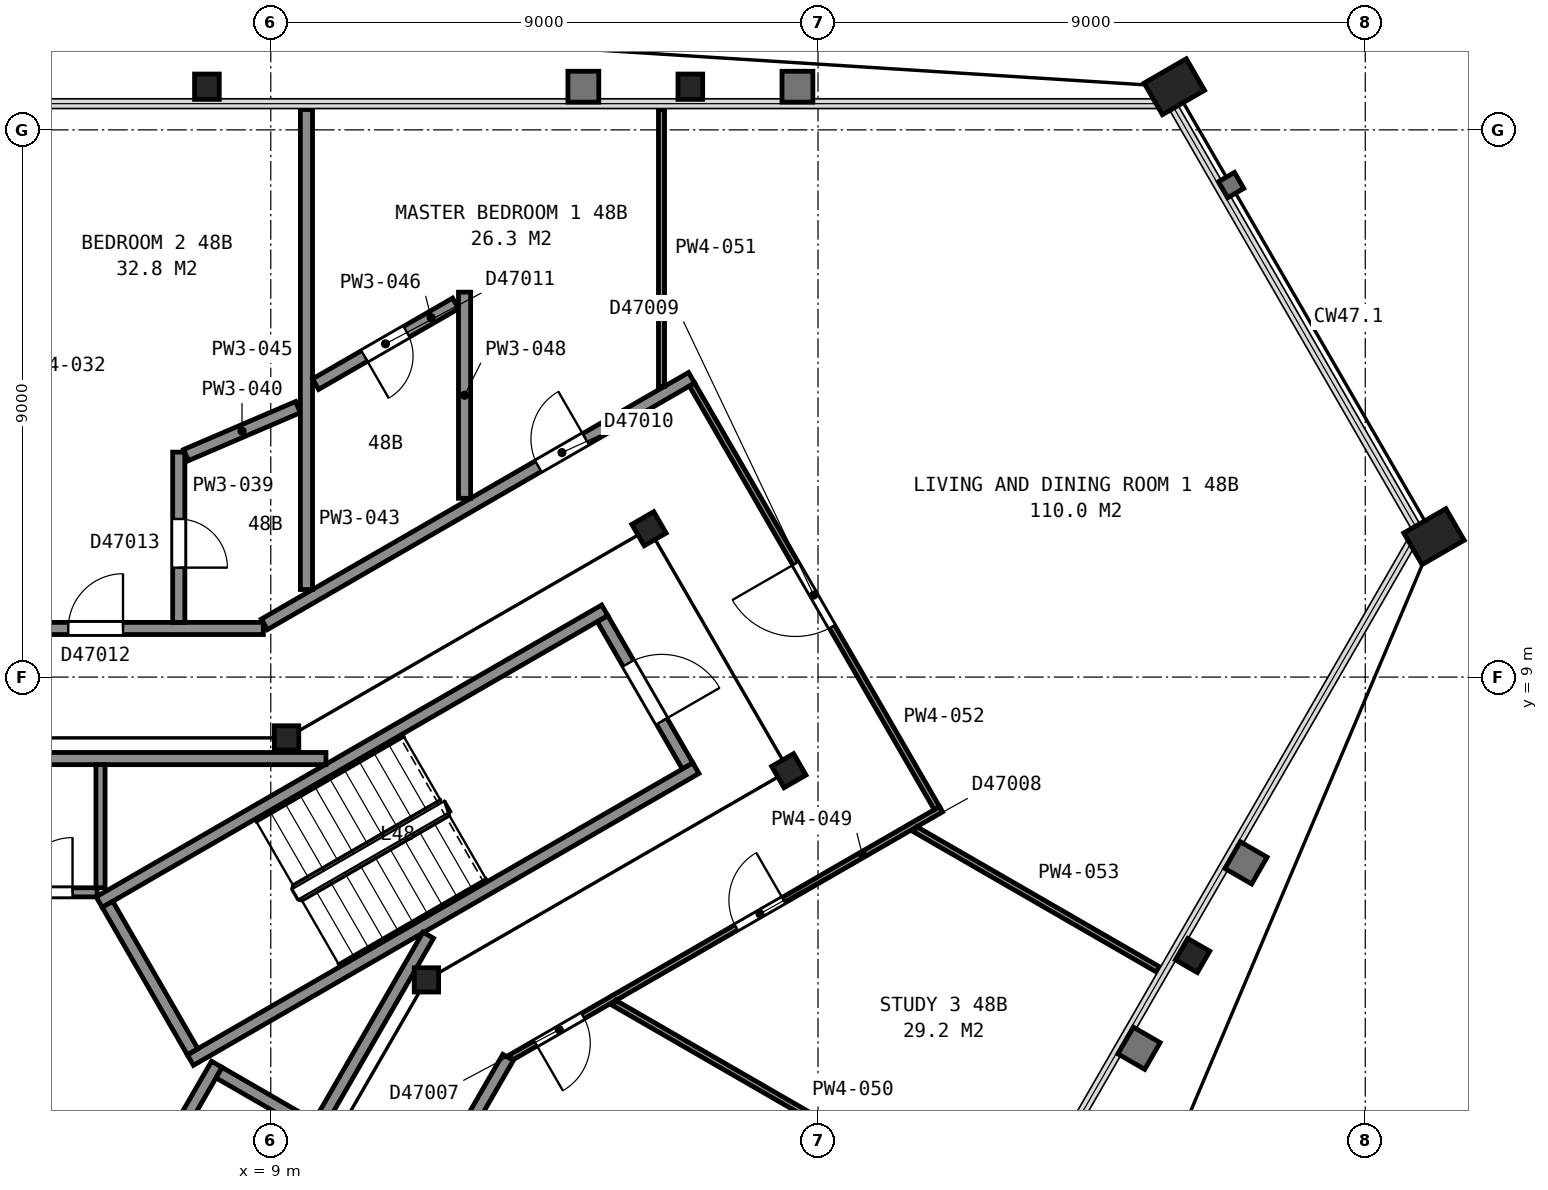
"""IFC4 building model, lengths in metres.
Left out: names, types, materials, properties, quantities, classifications, styles, units other than length and angle.
Written with IfcOpenShell. Run it as: python <this file> out.ifc"""

import sys

from ifc_helpers import new_model, si_unit, direction, frame, frame_2d, origin, origin_2d, place, context, subcontext, project, spatial, rectangle, hollow_rectangle, i_section, extrude, element, fill, save


model = new_model("IFC4")
c1 = context("Model", 3, precision=1e-05, world=origin(), true_north=direction((0.0, 1.0)))
c2 = subcontext(c1, "Body", "Model", "MODEL_VIEW")
j1 = project(units=[si_unit("LENGTHUNIT", "METRE"), si_unit("PLANEANGLEUNIT", "RADIAN")], contexts=[c1])
p1 = place(None, origin())
s1 = spatial("IfcSite", under=j1, at=p1, CompositionType="ELEMENT")
p2 = place(p1, origin())
s2 = spatial("IfcBuilding", under=s1, at=p2, CompositionType="ELEMENT")
p3 = place(p2, frame((0.0, 0.0, 193.2)))
s3 = spatial("IfcBuildingStorey", under=s2, at=p3, CompositionType="ELEMENT", Elevation=193.2)
p4 = place(p3, frame((23.86, 18.71, 0.0), z_axis=(0.0, 0.0, 1.0), x_axis=(0.5, -0.866025403784, 0.0)))
e1 = element("IfcColumn", 1, at=p4, inside=s3, PredefinedType="COLUMN", context=c2, shape_type="SweptSolid", body=[
    extrude(hollow_rectangle(XDim=0.6, YDim=0.8, WallThickness=0.05, at=origin_2d()), origin(), (0.0, 0.0, 1.0), 3.7),
])
for number, where, z_axis, x_axis in (
    (2, (15.9, 18.71, 0.0), (0.0, 0.0, 1.0), (1.0, 0.0, 0.0)),
    (3, (7.95, 18.71, 0.0), (0.0, 0.0, 1.0), (1.0, 0.0, 0.0)),
    (4, (24.16, 4.42, 0.0), (0.0, 0.0, 1.0), (-0.5, -0.866, 0.0)),
):
    element("IfcColumn", number, at=place(p3, frame(where, z_axis=z_axis, x_axis=x_axis)), inside=s3, PredefinedType="COLUMN", context=c2, shape_type="SweptSolid", body=[
        extrude(i_section(OverallWidth=0.406, OverallDepth=0.417, WebThickness=0.03, FlangeThickness=0.048, FilletRadius=0.015, at=origin_2d()), origin(), (0.0, 0.0, 1.0), 3.7),
    ])
p5 = place(p3, frame((28.13, 11.31, 0.0), z_axis=(0.0, 0.0, 1.0), x_axis=(0.5, -0.866025403784, 0.0)))
e5 = element("IfcColumn", 5, at=p5, inside=s3, PredefinedType="COLUMN", context=c2, shape_type="SweptSolid", body=[
    extrude(hollow_rectangle(XDim=0.6, YDim=0.8, WallThickness=0.05, at=origin_2d()), origin(), (0.0, 0.0, 1.0), 3.7),
])
p6 = place(p3, frame((11.56, 4.02, 0.0), z_axis=(0.0, 0.0, 1.0), x_axis=(1.0, 0.0, 0.0)))
e6 = element("IfcColumn", 6, at=p6, inside=s3, PredefinedType="COLUMN", context=c2, shape_type="SweptSolid", body=[
    extrude(i_section(OverallWidth=0.401, OverallDepth=0.399, WebThickness=0.025, FlangeThickness=0.04, FilletRadius=0.015, at=origin_2d()), origin(), (0.0, 0.0, 1.0), 3.7),
])
for number, where, z_axis, x_axis in (
    (7, (17.52, 7.46, 0.0), (0.0, 0.0, 1.0), (0.5, -0.866, 0.0)),
    (8, (15.22, 11.44, 0.0), (0.0, 0.0, 1.0), (0.5, -0.866, 0.0)),
):
    element("IfcColumn", number, at=place(p3, frame(where, z_axis=z_axis, x_axis=x_axis)), inside=s3, PredefinedType="COLUMN", context=c2, shape_type="SweptSolid", body=[
        extrude(i_section(OverallWidth=0.406, OverallDepth=0.417, WebThickness=0.03, FlangeThickness=0.048, FilletRadius=0.015, at=origin_2d()), origin(), (0.0, 0.0, 1.0), 3.7),
    ])
p7 = place(p3, frame((9.26, 8.0, 0.0), z_axis=(0.0, 0.0, 1.0), x_axis=(1.0, 0.0, 0.0)))
e9 = element("IfcColumn", 9, at=p7, inside=s3, PredefinedType="COLUMN", context=c2, shape_type="SweptSolid", body=[
    extrude(i_section(OverallWidth=0.401, OverallDepth=0.399, WebThickness=0.025, FlangeThickness=0.04, FilletRadius=0.015, at=origin_2d()), origin(), (0.0, 0.0, 1.0), 3.7),
])
p8 = place(p3, frame((15.855, 7.538, 0.0), z_axis=(0.0, 0.0, 1.0), x_axis=(-0.500049511043, 0.865996816683, 0.0)))
e10 = element("IfcWall", 10, at=p8, inside=s3, PredefinedType="PARTITIONING", context=c2, shape_type="SweptSolid", body=[
    extrude(rectangle(XDim=2.8, YDim=0.2, at=frame_2d((1.4, 0.0))), origin(), (0.0, 0.0, 1.0), 3.45),
])
p9 = place(p8, frame((0.85, 0.0, 0.0)))
e11 = element("IfcOpeningElement", 11, at=p9, cuts=e10, PredefinedType="OPENING", context=c2, shape_type="SweptSolid", body=[
    extrude(rectangle(XDim=1.1, YDim=2.1, at=frame_2d((0.55, 1.05))), frame((0.0, 0.11, 0.0), z_axis=(0.0, -1.0, 0.0), x_axis=(1.0, 0.0, 0.0)), (0.0, 0.0, 1.0), 0.22),
])
for number, where, z_axis, x_axis in (
    (12, (6.178, 5.299, 0.0), (0.0, 0.0, 1.0), (0.866, 0.5, 0.0)),
    (13, (7.678, 2.701, 0.0), (0.0, 0.0, 1.0), (0.866, 0.5, 0.0)),
):
    element("IfcWall", number, at=place(p3, frame(where, z_axis=z_axis, x_axis=x_axis)), inside=s3, PredefinedType="PARTITIONING", context=c2, shape_type="SweptSolid", body=[
        extrude(rectangle(XDim=9.6, YDim=0.2, at=frame_2d((4.8, 0.0))), origin(), (0.0, 0.0, 1.0), 3.45),
    ])
p10 = place(p3, frame((7.715, 2.838, 0.0), z_axis=(0.0, 0.0, 1.0), x_axis=(-0.500049511043, 0.865996816683, 0.0)))
e14 = element("IfcWall", 14, at=p10, inside=s3, PredefinedType="PARTITIONING", context=c2, shape_type="SweptSolid", body=[
    extrude(rectangle(XDim=2.8, YDim=0.2, at=frame_2d((1.4, 0.0))), origin(), (0.0, 0.0, 1.0), 3.45),
])
p11 = place(p3, frame((5.663, -1.612, 0.0), z_axis=(0.0, 0.0, 1.0), x_axis=(0.49998122708, 0.866036242063, 0.0)))
e15 = element("IfcWall", 15, at=p11, inside=s3, PredefinedType="PARTITIONING", context=c2, shape_type="SweptSolid", body=[
    extrude(rectangle(XDim=4.9, YDim=0.2, at=frame_2d((2.45, 0.0))), origin(), (0.0, 0.0, 1.0), 3.7),
])
p12 = place(p3, frame((9.665, 1.62, 0.0), z_axis=(0.0, 0.0, 1.0), x_axis=(-0.866002029911, 0.500040482552, 0.0)))
e16 = element("IfcWall", 16, at=p12, inside=s3, PredefinedType="PARTITIONING", context=c2, shape_type="SweptSolid", body=[
    extrude(rectangle(XDim=1.75, YDim=0.2, at=frame_2d((0.875, 0.0))), origin(), (0.0, 0.0, 1.0), 3.7),
])
p13 = place(p3, frame((-3.933, 7.66, 0.0), z_axis=(0.0, 0.0, 1.0), x_axis=(1.0, 0.0, 0.0)))
e17 = element("IfcWall", 17, at=p13, inside=s3, PredefinedType="PARTITIONING", context=c2, shape_type="SweptSolid", body=[
    extrude(rectangle(XDim=13.841, YDim=0.2, at=frame_2d((6.92, 0.0))), origin(), (0.0, 0.0, 1.0), 3.45),
])
p14 = place(p3, frame((0.925, 5.46, 0.0), z_axis=(0.0, 0.0, 1.0), x_axis=(1.0, 0.0, 0.0)))
e18 = element("IfcWall", 18, at=p14, inside=s3, PredefinedType="PARTITIONING", context=c2, shape_type="SweptSolid", body=[
    extrude(rectangle(XDim=5.22, YDim=0.15, at=frame_2d((2.61, 0.0))), origin(), (0.0, 0.0, 1.0), 3.45),
])
p15 = place(p14, frame((3.915, 0.0, 0.0)))
e19 = element("IfcOpeningElement", 19, at=p15, cuts=e18, PredefinedType="OPENING", context=c2, shape_type="SweptSolid", body=[
    extrude(rectangle(XDim=0.9, YDim=2.1, at=frame_2d((0.45, 1.05))), frame((0.0, 0.085, 0.0), z_axis=(0.0, -1.0, 0.0), x_axis=(1.0, 0.0, 0.0)), (0.0, 0.0, 1.0), 0.17),
])
p16 = place(p3, frame((6.2, 5.535, 0.0), z_axis=(0.0, 0.0, 1.0), x_axis=(0.0, 1.0, 0.0)))
e20 = element("IfcWall", 20, at=p16, inside=s3, PredefinedType="PARTITIONING", context=c2, shape_type="SweptSolid", body=[
    extrude(rectangle(XDim=2.025, YDim=0.15, at=frame_2d((1.013, 0.0))), origin(), (0.0, 0.0, 1.0), 3.45),
])
p17 = place(p3, frame((9.803, 1.658, 0.0), z_axis=(0.0, 0.0, 1.0), x_axis=(0.499943114462, 0.866058244174, 0.0)))
e21 = element("IfcWall", 21, at=p17, inside=s3, PredefinedType="PARTITIONING", context=c2, shape_type="SweptSolid", body=[
    extrude(rectangle(XDim=3.576, YDim=0.2, at=frame_2d((1.788, 0.0))), origin(), (0.0, 0.0, 1.0), 3.45),
])
p18 = place(p3, frame((-8.828, 9.8, 0.0), z_axis=(0.0, 0.0, 1.0), x_axis=(1.0, 0.0, 0.0)))
e22 = element("IfcWall", 22, at=p18, inside=s3, PredefinedType="PARTITIONING", context=c2, shape_type="SweptSolid", body=[
    extrude(rectangle(XDim=17.706, YDim=0.2, at=frame_2d((8.853, 0.0))), origin(), (0.0, 0.0, 1.0), 2.713),
])
p19 = place(p18, frame((14.498, 0.0, 0.0)))
e23 = element("IfcOpeningElement", 23, at=p19, cuts=e22, PredefinedType="OPENING", context=c2, shape_type="SweptSolid", body=[
    extrude(rectangle(XDim=0.9, YDim=2.1, at=frame_2d((0.45, 1.05))), frame((0.0, 0.11, 0.0), z_axis=(0.0, -1.0, 0.0), x_axis=(1.0, 0.0, 0.0)), (0.0, 0.0, 1.0), 0.22),
])
p20 = place(p18, frame((10.919, 0.0, 0.0)))
e24 = element("IfcOpeningElement", 24, at=p20, cuts=e22, PredefinedType="OPENING", context=c2, shape_type="SweptSolid", body=[
    extrude(rectangle(XDim=0.9, YDim=2.1, at=frame_2d((0.45, 1.05))), frame((0.0, 0.11, 0.0), z_axis=(0.0, -1.0, 0.0), x_axis=(1.0, 0.0, 0.0)), (0.0, 0.0, 1.0), 0.22),
])
p21 = place(p18, frame((6.113, 0.0, 0.0)))
e25 = element("IfcOpeningElement", 25, at=p21, cuts=e22, PredefinedType="OPENING", context=c2, shape_type="SweptSolid", body=[
    extrude(rectangle(XDim=0.9, YDim=2.1, at=frame_2d((0.45, 1.05))), frame((0.0, 0.11, 0.0), z_axis=(0.0, -1.0, 0.0), x_axis=(1.0, 0.0, 0.0)), (0.0, 0.0, 1.0), 0.22),
])
p22 = place(p3, frame((12.903, 2.745, 0.0), z_axis=(0.0, 0.0, 1.0), x_axis=(-0.499992063946, -0.866029985619, 0.0)))
e26 = element("IfcWall", 26, at=p22, inside=s3, PredefinedType="PARTITIONING", context=c2, shape_type="SweptSolid", body=[
    extrude(rectangle(XDim=12.907, YDim=0.2, at=frame_2d((6.454, 0.0))), origin(), (0.0, 0.0, 1.0), 2.713),
])
p23 = place(p22, frame((9.032, 0.0, 0.0)))
e27 = element("IfcOpeningElement", 27, at=p23, cuts=e26, PredefinedType="OPENING", context=c2, shape_type="SweptSolid", body=[
    extrude(rectangle(XDim=0.9, YDim=2.1, at=frame_2d((0.45, 1.05))), frame((0.0, 0.11, 0.0), z_axis=(0.0, -1.0, 0.0), x_axis=(1.0, 0.0, 0.0)), (0.0, 0.0, 1.0), 0.22),
])
p24 = place(p22, frame((5.349, 0.0, 0.0)))
e28 = element("IfcOpeningElement", 28, at=p24, cuts=e26, PredefinedType="OPENING", context=c2, shape_type="SweptSolid", body=[
    extrude(rectangle(XDim=0.9, YDim=2.1, at=frame_2d((0.45, 1.05))), frame((0.0, 0.11, 0.0), z_axis=(0.0, -1.0, 0.0), x_axis=(1.0, 0.0, 0.0)), (0.0, 0.0, 1.0), 0.22),
])
p25 = place(p3, frame((7.487, 12.7, 0.0), z_axis=(0.0, 0.0, 1.0), x_axis=(0.0, -1.0, 0.0)))
e29 = element("IfcWall", 29, at=p25, inside=s3, PredefinedType="PARTITIONING", context=c2, shape_type="SweptSolid", body=[
    extrude(rectangle(XDim=2.8, YDim=0.2, at=frame_2d((1.4, 0.0))), origin(), (0.0, 0.0, 1.0), 2.713),
])
p26 = place(p25, frame((1.1, 0.0, 0.0)))
e30 = element("IfcOpeningElement", 30, at=p26, cuts=e29, PredefinedType="OPENING", context=c2, shape_type="SweptSolid", body=[
    extrude(rectangle(XDim=0.8, YDim=2.1, at=frame_2d((0.4, 1.05))), frame((0.0, 0.11, 0.0), z_axis=(0.0, -1.0, 0.0), x_axis=(1.0, 0.0, 0.0)), (0.0, 0.0, 1.0), 0.22),
])
p27 = place(p3, frame((7.606, 12.651, 0.0), z_axis=(0.0, 0.0, 1.0), x_axis=(0.919138725477, 0.39393400885, 0.0)))
e31 = element("IfcWall", 31, at=p27, inside=s3, PredefinedType="PARTITIONING", context=c2, shape_type="SweptSolid", body=[
    extrude(rectangle(XDim=2.003, YDim=0.2, at=frame_2d((1.001, 0.0))), origin(), (0.0, 0.0, 1.0), 2.713),
])
p28 = place(p3, frame((8.895, 9.867, 0.0), z_axis=(0.0, 0.0, 1.0), x_axis=(0.866079355551, 0.499906541154, 0.0)))
e32 = element("IfcWall", 32, at=p28, inside=s3, PredefinedType="PARTITIONING", context=c2, shape_type="SweptSolid", body=[
    extrude(rectangle(XDim=8.113, YDim=0.2, at=frame_2d((4.056, 0.0))), origin(), (0.0, 0.0, 1.0), 2.713),
])
p29 = place(p28, frame((5.201, 0.0, 0.0)))
e33 = element("IfcOpeningElement", 33, at=p29, cuts=e32, PredefinedType="OPENING", context=c2, shape_type="SweptSolid", body=[
    extrude(rectangle(XDim=0.9, YDim=2.1, at=frame_2d((0.45, 1.05))), frame((0.0, 0.11, 0.0), z_axis=(0.0, -1.0, 0.0), x_axis=(1.0, 0.0, 0.0)), (0.0, 0.0, 1.0), 0.22),
])
p30 = place(p3, frame((9.587, 10.44, 0.0), z_axis=(0.0, 0.0, 1.0), x_axis=(0.0, 1.0, 0.0)))
e34 = element("IfcWall", 34, at=p30, inside=s3, PredefinedType="PARTITIONING", context=c2, shape_type="SweptSolid", body=[
    extrude(rectangle(XDim=7.895, YDim=0.2, at=frame_2d((3.947, 0.0))), origin(), (0.0, 0.0, 1.0), 2.713),
])
p31 = place(p3, frame((12.04, 15.146, 0.0), z_axis=(0.0, 0.0, 1.0), x_axis=(-0.866206990114, -0.499685351273, 0.0)))
e35 = element("IfcWall", 35, at=p31, inside=s3, PredefinedType="PARTITIONING", context=c2, shape_type="SweptSolid", body=[
    extrude(rectangle(XDim=2.658, YDim=0.2, at=frame_2d((1.329, 0.0))), origin(), (0.0, 0.0, 1.0), 2.713),
])
p32 = place(p31, frame((0.932, 0.0, 0.0)))
e36 = element("IfcOpeningElement", 36, at=p32, cuts=e35, PredefinedType="OPENING", context=c2, shape_type="SweptSolid", body=[
    extrude(rectangle(XDim=0.8, YDim=2.1, at=frame_2d((0.4, 1.05))), frame((0.0, 0.11, 0.0), z_axis=(0.0, -1.0, 0.0), x_axis=(1.0, 0.0, 0.0)), (0.0, 0.0, 1.0), 0.22),
])
p33 = place(p3, frame((12.187, 11.94, 0.0), z_axis=(0.0, 0.0, 1.0), x_axis=(0.0, 1.0, 0.0)))
e37 = element("IfcWall", 37, at=p33, inside=s3, PredefinedType="PARTITIONING", context=c2, shape_type="SweptSolid", body=[
    extrude(rectangle(XDim=3.391, YDim=0.2, at=frame_2d((1.695, 0.0))), origin(), (0.0, 0.0, 1.0), 2.713),
])
p34 = place(p3, frame((20.023, 6.826, 0.0), z_axis=(0.0, 0.0, 1.0), x_axis=(-0.86608949446, -0.499888975259, 0.0)))
e38 = element("IfcWall", 38, at=p34, inside=s3, PredefinedType="PARTITIONING", context=c2, shape_type="SweptSolid", body=[
    extrude(rectangle(XDim=8.165, YDim=0.1, at=frame_2d((4.083, 0.0))), origin(), (0.0, 0.0, 1.0), 2.713),
])
p35 = place(p34, frame((6.8, 0.0, 0.0)))
e39 = element("IfcOpeningElement", 39, at=p35, cuts=e38, PredefinedType="OPENING", context=c2, shape_type="SweptSolid", body=[
    extrude(rectangle(XDim=0.9, YDim=2.1, at=frame_2d((0.45, 1.05))), frame((0.0, 0.06, 0.0), z_axis=(0.0, -1.0, 0.0), x_axis=(1.0, 0.0, 0.0)), (0.0, 0.0, 1.0), 0.12),
])
p36 = place(p34, frame((2.989, 0.0, 0.0)))
e40 = element("IfcOpeningElement", 40, at=p36, cuts=e38, PredefinedType="OPENING", context=c2, shape_type="SweptSolid", body=[
    extrude(rectangle(XDim=0.9, YDim=2.1, at=frame_2d((0.45, 1.05))), frame((0.0, 0.06, 0.0), z_axis=(0.0, -1.0, 0.0), x_axis=(1.0, 0.0, 0.0)), (0.0, 0.0, 1.0), 0.12),
])
p37 = place(p3, frame((14.651, 3.64, 0.0), z_axis=(0.0, 0.0, 1.0), x_axis=(0.866021145342, -0.500007375767, 0.0)))
e41 = element("IfcWall", 41, at=p37, inside=s3, PredefinedType="PARTITIONING", context=c2, shape_type="SweptSolid", body=[
    extrude(rectangle(XDim=7.467, YDim=0.1, at=frame_2d((3.733, 0.0))), origin(), (0.0, 0.0, 1.0), 2.713),
])
p38 = place(p3, frame((15.426, 13.781, 0.0), z_axis=(0.0, 0.0, 1.0), x_axis=(0.0, 1.0, 0.0)))
e42 = element("IfcWall", 42, at=p38, inside=s3, PredefinedType="PARTITIONING", context=c2, shape_type="SweptSolid", body=[
    extrude(rectangle(XDim=4.554, YDim=0.1, at=frame_2d((2.277, 0.0))), origin(), (0.0, 0.0, 1.0), 2.713),
])
p39 = place(p3, frame((15.928, 13.812, 0.0), z_axis=(0.0, 0.0, 1.0), x_axis=(0.500422653123, -0.865781247337, 0.0)))
e43 = element("IfcWall", 43, at=p39, inside=s3, PredefinedType="PARTITIONING", context=c2, shape_type="SweptSolid", body=[
    extrude(rectangle(XDim=8.047, YDim=0.1, at=frame_2d((4.024, 0.0))), origin(), (0.0, 0.0, 1.0), 2.713),
])
p40 = place(p39, frame((3.4, 0.0, 0.0)))
e44 = element("IfcOpeningElement", 44, at=p40, cuts=e43, PredefinedType="OPENING", context=c2, shape_type="SweptSolid", body=[
    extrude(rectangle(XDim=1.2, YDim=2.1, at=frame_2d((0.6, 1.05))), frame((0.0, 0.06, 0.0), z_axis=(0.0, -1.0, 0.0), x_axis=(1.0, 0.0, 0.0)), (0.0, 0.0, 1.0), 0.12),
])
p41 = place(p3, frame((19.601, 6.496, 0.0), z_axis=(0.0, 0.0, 1.0), x_axis=(0.866056775574, -0.499945658529, 0.0)))
e45 = element("IfcWall", 45, at=p41, inside=s3, PredefinedType="PARTITIONING", context=c2, shape_type="SweptSolid", body=[
    extrude(rectangle(XDim=4.608, YDim=0.1, at=frame_2d((2.304, 0.0))), origin(), (0.0, 0.0, 1.0), 2.713),
])
p42 = place(p9, origin())
e46 = element("IfcDoor", 46, at=p42, inside=s3, OperationType="SINGLE_SWING_LEFT", PredefinedType="DOOR", context=c2, shape_type="SweptSolid", body=[
    extrude(rectangle(XDim=1.1, YDim=2.1, at=frame_2d((0.55, 1.05))), frame((0.0, 0.025, 0.0), z_axis=(0.0, -1.0, 0.0), x_axis=(1.0, 0.0, 0.0)), (0.0, 0.0, 1.0), 0.05),
])
fill(e11, e46)
p43 = place(p15, origin())
e47 = element("IfcDoor", 47, at=p43, inside=s3, OperationType="SINGLE_SWING_RIGHT", PredefinedType="DOOR", context=c2, shape_type="SweptSolid", body=[
    extrude(rectangle(XDim=0.9, YDim=2.1, at=frame_2d((0.45, 1.05))), frame((0.0, 0.025, 0.0), z_axis=(0.0, -1.0, 0.0), x_axis=(1.0, 0.0, 0.0)), (0.0, 0.0, 1.0), 0.05),
])
fill(e19, e47)
p44 = place(p19, origin())
e48 = element("IfcDoor", 48, at=p44, inside=s3, OperationType="SINGLE_SWING_RIGHT", PredefinedType="DOOR", context=c2, shape_type="SweptSolid", body=[
    extrude(rectangle(XDim=0.9, YDim=2.1, at=frame_2d((0.45, 1.05))), frame((0.0, 0.025, 0.0), z_axis=(0.0, -1.0, 0.0), x_axis=(1.0, 0.0, 0.0)), (0.0, 0.0, 1.0), 0.05),
])
fill(e23, e48)
p45 = place(p26, origin())
e49 = element("IfcDoor", 49, at=p45, inside=s3, OperationType="SINGLE_SWING_RIGHT", PredefinedType="DOOR", context=c2, shape_type="SweptSolid", body=[
    extrude(rectangle(XDim=0.8, YDim=2.1, at=frame_2d((0.4, 1.05))), frame((0.0, 0.025, 0.0), z_axis=(0.0, -1.0, 0.0), x_axis=(1.0, 0.0, 0.0)), (0.0, 0.0, 1.0), 0.05),
])
fill(e30, e49)
p46 = place(p29, origin())
e50 = element("IfcDoor", 50, at=p46, inside=s3, OperationType="SINGLE_SWING_RIGHT", PredefinedType="DOOR", context=c2, shape_type="SweptSolid", body=[
    extrude(rectangle(XDim=0.9, YDim=2.1, at=frame_2d((0.45, 1.05))), frame((0.0, 0.025, 0.0), z_axis=(0.0, -1.0, 0.0), x_axis=(1.0, 0.0, 0.0)), (0.0, 0.0, 1.0), 0.05),
])
fill(e33, e50)
p47 = place(p32, origin())
e51 = element("IfcDoor", 51, at=p47, inside=s3, OperationType="SINGLE_SWING_RIGHT", PredefinedType="DOOR", context=c2, shape_type="SweptSolid", body=[
    extrude(rectangle(XDim=0.8, YDim=2.1, at=frame_2d((0.4, 1.05))), frame((0.0, 0.025, 0.0), z_axis=(0.0, -1.0, 0.0), x_axis=(1.0, 0.0, 0.0)), (0.0, 0.0, 1.0), 0.05),
])
fill(e36, e51)
p48 = place(p35, origin())
e52 = element("IfcDoor", 52, at=p48, inside=s3, OperationType="SINGLE_SWING_RIGHT", PredefinedType="DOOR", context=c2, shape_type="SweptSolid", body=[
    extrude(rectangle(XDim=0.9, YDim=2.1, at=frame_2d((0.45, 1.05))), frame((0.0, 0.025, 0.0), z_axis=(0.0, -1.0, 0.0), x_axis=(1.0, 0.0, 0.0)), (0.0, 0.0, 1.0), 0.05),
])
fill(e39, e52)
p49 = place(p36, origin())
e53 = element("IfcDoor", 53, at=p49, inside=s3, OperationType="SINGLE_SWING_LEFT", PredefinedType="DOOR", context=c2, shape_type="SweptSolid", body=[
    extrude(rectangle(XDim=0.9, YDim=2.1, at=frame_2d((0.45, 1.05))), frame((0.0, 0.025, 0.0), z_axis=(0.0, -1.0, 0.0), x_axis=(1.0, 0.0, 0.0)), (0.0, 0.0, 1.0), 0.05),
])
fill(e40, e53)
p50 = place(p40, origin())
e54 = element("IfcDoor", 54, at=p50, inside=s3, OperationType="SINGLE_SWING_LEFT", PredefinedType="DOOR", context=c2, shape_type="SweptSolid", body=[
    extrude(rectangle(XDim=1.2, YDim=2.1, at=frame_2d((0.6, 1.05))), frame((0.0, 0.025, 0.0), z_axis=(0.0, -1.0, 0.0), x_axis=(1.0, 0.0, 0.0)), (0.0, 0.0, 1.0), 0.05),
])
fill(e44, e54)
save(model, sys.argv[1])
